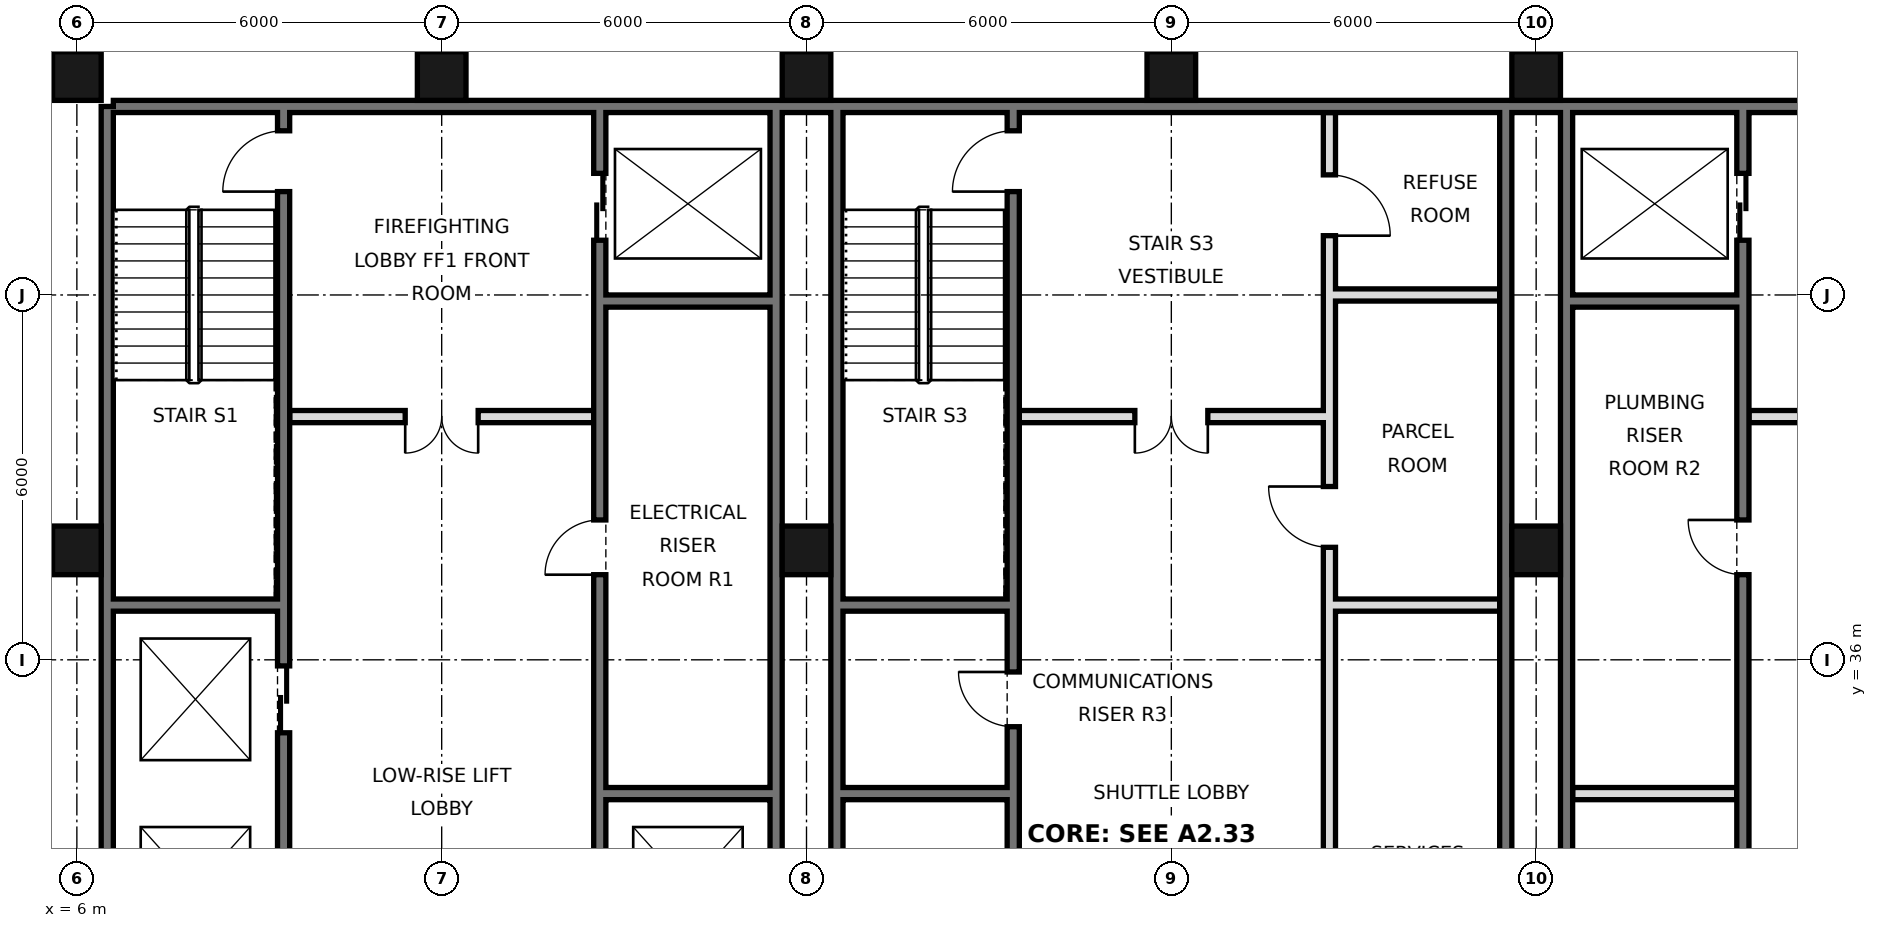
"""IFC4 building model, lengths in metres.
Left out: names, types, materials, properties, quantities, classifications, styles, units other than length and angle.
Written with IfcOpenShell. Run it as: python <this file> out.ifc"""

import sys

from ifc_helpers import new_model, si_unit, direction, frame, frame_2d, origin, origin_2d, place, context, subcontext, project, spatial, rectangle, hollow_rectangle, extrude, element, fill, save


model = new_model("IFC4")
c1 = context("Model", 3, precision=1e-05, world=origin(), true_north=direction((0.0, 1.0)))
c2 = subcontext(c1, "Body", "Model", "MODEL_VIEW")
j1 = project(units=[si_unit("LENGTHUNIT", "METRE"), si_unit("PLANEANGLEUNIT", "RADIAN")], contexts=[c1])
p1 = place(None, origin())
s1 = spatial("IfcSite", under=j1, at=p1, CompositionType="ELEMENT")
p2 = place(p1, origin())
s2 = spatial("IfcBuilding", under=s1, at=p2, CompositionType="ELEMENT")
p3 = place(p2, frame((0.0, 0.0, 130.4)))
s3 = spatial("IfcBuildingStorey", under=s2, at=p3, CompositionType="ELEMENT", Elevation=130.4)
for number, where, z_axis, x_axis in (
    (1, (6.0, 37.8, 0.0), (0.0, 0.0, 1.0), (1.0, 0.0, 0.0)),
    (2, (6.0, 45.6, 0.0), (0.0, 0.0, 1.0), (1.0, 0.0, 0.0)),
    (3, (12.0, 45.6, 0.0), (0.0, 0.0, 1.0), (1.0, 0.0, 0.0)),
    (4, (18.0, 37.8, 0.0), (0.0, 0.0, 1.0), (1.0, 0.0, 0.0)),
    (5, (18.0, 45.6, 0.0), (0.0, 0.0, 1.0), (1.0, 0.0, 0.0)),
    (6, (24.0, 45.6, 0.0), (0.0, 0.0, 1.0), (1.0, 0.0, 0.0)),
    (7, (30.0, 37.8, 0.0), (0.0, 0.0, 1.0), (1.0, 0.0, 0.0)),
    (8, (30.0, 45.6, 0.0), (0.0, 0.0, 1.0), (1.0, 0.0, 0.0)),
):
    element("IfcColumn", number, at=place(p3, frame(where, z_axis=z_axis, x_axis=x_axis)), inside=s3, PredefinedType="COLUMN", context=c2, shape_type="SweptSolid", body=[
        extrude(hollow_rectangle(XDim=0.8, YDim=0.8, WallThickness=0.05, at=origin_2d()), origin(), (0.0, 0.0, 1.0), 3.6),
    ])
p4 = place(p3, frame((6.5, 21.6, 0.0), z_axis=(0.0, 0.0, 1.0), x_axis=(0.0, 1.0, 0.0)))
e9 = element("IfcWall", 9, at=p4, inside=s3, PredefinedType="SOLIDWALL", context=c2, shape_type="SweptSolid", body=[
    extrude(rectangle(XDim=23.5, YDim=0.2, at=frame_2d((11.75, 0.0))), origin(), (0.0, 0.0, 1.0), 3.42),
])
p5 = place(p3, frame((6.6, 45.1, 0.0), z_axis=(0.0, 0.0, 1.0), x_axis=(1.0, 0.0, 0.0)))
e10 = element("IfcWall", 10, at=p5, inside=s3, PredefinedType="SOLIDWALL", context=c2, shape_type="SweptSolid", body=[
    extrude(rectangle(XDim=34.8, YDim=0.2, at=frame_2d((17.4, 0.0))), origin(), (0.0, 0.0, 1.0), 3.42),
])
for number, where, z_axis, x_axis in (
    (11, (17.5, 27.6, 0.0), (0.0, 0.0, 1.0), (0.0, 1.0, 0.0)),
    (12, (18.5, 27.6, 0.0), (0.0, 0.0, 1.0), (0.0, 1.0, 0.0)),
    (13, (29.5, 27.6, 0.0), (0.0, 0.0, 1.0), (0.0, 1.0, 0.0)),
    (14, (30.5, 27.6, 0.0), (0.0, 0.0, 1.0), (0.0, 1.0, 0.0)),
):
    element("IfcWall", number, at=place(p3, frame(where, z_axis=z_axis, x_axis=x_axis)), inside=s3, PredefinedType="SOLIDWALL", context=c2, shape_type="SweptSolid", body=[
        extrude(rectangle(XDim=17.5, YDim=0.2, at=frame_2d((8.75, 0.0))), origin(), (0.0, 0.0, 1.0), 3.42),
    ])
p6 = place(p3, frame((14.6, 27.5, 0.0), z_axis=(0.0, 0.0, 1.0), x_axis=(0.0, 1.0, 0.0)))
e15 = element("IfcWall", 15, at=p6, inside=s3, PredefinedType="SOLIDWALL", context=c2, shape_type="SweptSolid", body=[
    extrude(rectangle(XDim=17.5, YDim=0.2, at=frame_2d((8.75, 0.0))), origin(), (0.0, 0.0, 1.0), 3.42),
])
p7 = place(p6, frame((1.1, 0.0, 0.0)))
e16 = element("IfcOpeningElement", 16, at=p7, cuts=e15, PredefinedType="OPENING", context=c2, shape_type="SweptSolid", body=[
    extrude(rectangle(XDim=1.1, YDim=2.1, at=frame_2d((0.55, 1.05))), frame((0.0, 0.11, 0.0), z_axis=(0.0, -1.0, 0.0), x_axis=(1.0, 0.0, 0.0)), (0.0, 0.0, 1.0), 0.22),
])
p8 = place(p6, frame((4.2, 0.0, 0.0)))
e17 = element("IfcOpeningElement", 17, at=p8, cuts=e15, PredefinedType="OPENING", context=c2, shape_type="SweptSolid", body=[
    extrude(rectangle(XDim=1.1, YDim=2.1, at=frame_2d((0.55, 1.05))), frame((0.0, 0.11, 0.0), z_axis=(0.0, -1.0, 0.0), x_axis=(1.0, 0.0, 0.0)), (0.0, 0.0, 1.0), 0.22),
])
p9 = place(p6, frame((15.4, 0.0, 0.0)))
e18 = element("IfcOpeningElement", 18, at=p9, cuts=e15, PredefinedType="OPENING", context=c2, shape_type="SweptSolid", body=[
    extrude(rectangle(XDim=1.1, YDim=2.1, at=frame_2d((0.55, 1.05))), frame((0.0, 0.11, 0.0), z_axis=(0.0, -1.0, 0.0), x_axis=(1.0, 0.0, 0.0)), (0.0, 0.0, 1.0), 0.22),
])
p10 = place(p6, frame((9.9, 0.0, 0.0)))
e19 = element("IfcOpeningElement", 19, at=p10, cuts=e15, PredefinedType="OPENING", context=c2, shape_type="SweptSolid", body=[
    extrude(rectangle(XDim=0.9, YDim=2.1, at=frame_2d((0.45, 1.05))), frame((0.0, 0.11, 0.0), z_axis=(0.0, -1.0, 0.0), x_axis=(1.0, 0.0, 0.0)), (0.0, 0.0, 1.0), 0.22),
])
p11 = place(p3, frame((21.4, 27.5, 0.0), z_axis=(0.0, 0.0, 1.0), x_axis=(0.0, 1.0, 0.0)))
e20 = element("IfcWall", 20, at=p11, inside=s3, PredefinedType="SOLIDWALL", context=c2, shape_type="SweptSolid", body=[
    extrude(rectangle(XDim=17.5, YDim=0.2, at=frame_2d((8.75, 0.0))), origin(), (0.0, 0.0, 1.0), 3.42),
])
p12 = place(p11, frame((16.2, 0.0, 0.0)))
e21 = element("IfcOpeningElement", 21, at=p12, cuts=e20, PredefinedType="OPENING", context=c2, shape_type="SweptSolid", body=[
    extrude(rectangle(XDim=1.0, YDim=2.1, at=frame_2d((0.5, 1.05))), frame((0.0, 0.11, 0.0), z_axis=(0.0, -1.0, 0.0), x_axis=(1.0, 0.0, 0.0)), (0.0, 0.0, 1.0), 0.22),
])
p13 = place(p11, frame((7.4, 0.0, 0.0)))
e22 = element("IfcOpeningElement", 22, at=p13, cuts=e20, PredefinedType="OPENING", context=c2, shape_type="SweptSolid", body=[
    extrude(rectangle(XDim=0.9, YDim=2.1, at=frame_2d((0.45, 1.05))), frame((0.0, 0.11, 0.0), z_axis=(0.0, -1.0, 0.0), x_axis=(1.0, 0.0, 0.0)), (0.0, 0.0, 1.0), 0.22),
])
p14 = place(p3, frame((26.6, 27.5, 0.0), z_axis=(0.0, 0.0, 1.0), x_axis=(0.0, 1.0, 0.0)))
e23 = element("IfcWall", 23, at=p14, inside=s3, PredefinedType="SOLIDWALL", context=c2, shape_type="SweptSolid", body=[
    extrude(rectangle(XDim=17.5, YDim=0.2, at=frame_2d((8.75, 0.0))), origin(), (0.0, 0.0, 1.0), 3.42),
])
p15 = place(p14, frame((4.3, 0.0, 0.0)))
e24 = element("IfcOpeningElement", 24, at=p15, cuts=e23, PredefinedType="OPENING", context=c2, shape_type="SweptSolid", body=[
    extrude(rectangle(XDim=0.9, YDim=2.1, at=frame_2d((0.45, 1.05))), frame((0.0, 0.11, 0.0), z_axis=(0.0, -1.0, 0.0), x_axis=(1.0, 0.0, 0.0)), (0.0, 0.0, 1.0), 0.22),
])
p16 = place(p14, frame((10.35, 0.0, 0.0)))
e25 = element("IfcOpeningElement", 25, at=p16, cuts=e23, PredefinedType="OPENING", context=c2, shape_type="SweptSolid", body=[
    extrude(rectangle(XDim=1.0, YDim=2.1, at=frame_2d((0.5, 1.05))), frame((0.0, 0.11, 0.0), z_axis=(0.0, -1.0, 0.0), x_axis=(1.0, 0.0, 0.0)), (0.0, 0.0, 1.0), 0.22),
])
p17 = place(p14, frame((15.475, 0.0, 0.0)))
e26 = element("IfcOpeningElement", 26, at=p17, cuts=e23, PredefinedType="OPENING", context=c2, shape_type="SweptSolid", body=[
    extrude(rectangle(XDim=1.0, YDim=2.1, at=frame_2d((0.5, 1.05))), frame((0.0, 0.11, 0.0), z_axis=(0.0, -1.0, 0.0), x_axis=(1.0, 0.0, 0.0)), (0.0, 0.0, 1.0), 0.22),
])
p18 = place(p3, frame((33.4, 27.5, 0.0), z_axis=(0.0, 0.0, 1.0), x_axis=(0.0, 1.0, 0.0)))
e27 = element("IfcWall", 27, at=p18, inside=s3, PredefinedType="SOLIDWALL", context=c2, shape_type="SweptSolid", body=[
    extrude(rectangle(XDim=17.5, YDim=0.2, at=frame_2d((8.75, 0.0))), origin(), (0.0, 0.0, 1.0), 3.42),
])
p19 = place(p18, frame((15.4, 0.0, 0.0)))
e28 = element("IfcOpeningElement", 28, at=p19, cuts=e27, PredefinedType="OPENING", context=c2, shape_type="SweptSolid", body=[
    extrude(rectangle(XDim=1.1, YDim=2.1, at=frame_2d((0.55, 1.05))), frame((0.0, 0.11, 0.0), z_axis=(0.0, -1.0, 0.0), x_axis=(1.0, 0.0, 0.0)), (0.0, 0.0, 1.0), 0.22),
])
p20 = place(p18, frame((2.7, 0.0, 0.0)))
e29 = element("IfcOpeningElement", 29, at=p20, cuts=e27, PredefinedType="OPENING", context=c2, shape_type="SweptSolid", body=[
    extrude(rectangle(XDim=1.0, YDim=2.1, at=frame_2d((0.5, 1.05))), frame((0.0, 0.11, 0.0), z_axis=(0.0, -1.0, 0.0), x_axis=(1.0, 0.0, 0.0)), (0.0, 0.0, 1.0), 0.22),
])
p21 = place(p18, frame((9.9, 0.0, 0.0)))
e30 = element("IfcOpeningElement", 30, at=p21, cuts=e27, PredefinedType="OPENING", context=c2, shape_type="SweptSolid", body=[
    extrude(rectangle(XDim=0.9, YDim=2.1, at=frame_2d((0.45, 1.05))), frame((0.0, 0.11, 0.0), z_axis=(0.0, -1.0, 0.0), x_axis=(1.0, 0.0, 0.0)), (0.0, 0.0, 1.0), 0.22),
])
p22 = place(p3, frame((9.4, 21.6, 0.0), z_axis=(0.0, 0.0, 1.0), x_axis=(0.0, 1.0, 0.0)))
e31 = element("IfcWall", 31, at=p22, inside=s3, PredefinedType="SOLIDWALL", context=c2, shape_type="SweptSolid", body=[
    extrude(rectangle(XDim=23.4, YDim=0.2, at=frame_2d((11.7, 0.0))), origin(), (0.0, 0.0, 1.0), 3.42),
])
p23 = place(p22, frame((7.0, 0.0, 0.0)))
e32 = element("IfcOpeningElement", 32, at=p23, cuts=e31, PredefinedType="OPENING", context=c2, shape_type="SweptSolid", body=[
    extrude(rectangle(XDim=1.1, YDim=2.1, at=frame_2d((0.55, 1.05))), frame((0.0, 0.11, 0.0), z_axis=(0.0, -1.0, 0.0), x_axis=(1.0, 0.0, 0.0)), (0.0, 0.0, 1.0), 0.22),
])
p24 = place(p22, frame((10.1, 0.0, 0.0)))
e33 = element("IfcOpeningElement", 33, at=p24, cuts=e31, PredefinedType="OPENING", context=c2, shape_type="SweptSolid", body=[
    extrude(rectangle(XDim=1.1, YDim=2.1, at=frame_2d((0.55, 1.05))), frame((0.0, 0.11, 0.0), z_axis=(0.0, -1.0, 0.0), x_axis=(1.0, 0.0, 0.0)), (0.0, 0.0, 1.0), 0.22),
])
p25 = place(p22, frame((13.2, 0.0, 0.0)))
e34 = element("IfcOpeningElement", 34, at=p25, cuts=e31, PredefinedType="OPENING", context=c2, shape_type="SweptSolid", body=[
    extrude(rectangle(XDim=1.1, YDim=2.1, at=frame_2d((0.55, 1.05))), frame((0.0, 0.11, 0.0), z_axis=(0.0, -1.0, 0.0), x_axis=(1.0, 0.0, 0.0)), (0.0, 0.0, 1.0), 0.22),
])
p26 = place(p22, frame((22.1, 0.0, 0.0)))
e35 = element("IfcOpeningElement", 35, at=p26, cuts=e31, PredefinedType="OPENING", context=c2, shape_type="SweptSolid", body=[
    extrude(rectangle(XDim=1.0, YDim=2.1, at=frame_2d((0.5, 1.05))), frame((0.0, 0.11, 0.0), z_axis=(0.0, -1.0, 0.0), x_axis=(1.0, 0.0, 0.0)), (0.0, 0.0, 1.0), 0.22),
])
p27 = place(p22, frame((0.175, 0.0, 0.0)))
e36 = element("IfcOpeningElement", 36, at=p27, cuts=e31, PredefinedType="OPENING", context=c2, shape_type="SweptSolid", body=[
    extrude(rectangle(XDim=0.9, YDim=2.1, at=frame_2d((0.45, 1.05))), frame((0.0, 0.11, 0.0), z_axis=(0.0, -1.0, 0.0), x_axis=(1.0, 0.0, 0.0)), (0.0, 0.0, 1.0), 0.22),
])
for number, where, z_axis, x_axis in (
    (37, (14.7, 33.8, 0.0), (0.0, 0.0, 1.0), (1.0, 0.0, 0.0)),
    (38, (18.6, 33.8, 0.0), (0.0, 0.0, 1.0), (1.0, 0.0, 0.0)),
    (39, (30.6, 33.8, 0.0), (0.0, 0.0, 1.0), (1.0, 0.0, 0.0)),
    (40, (18.6, 36.9, 0.0), (0.0, 0.0, 1.0), (1.0, 0.0, 0.0)),
    (41, (26.7, 36.9, 0.0), (0.0, 0.0, 1.0), (1.0, 0.0, 0.0)),
    (42, (6.6, 36.9, 0.0), (0.0, 0.0, 1.0), (1.0, 0.0, 0.0)),
):
    element("IfcWall", number, at=place(p3, frame(where, z_axis=z_axis, x_axis=x_axis)), inside=s3, PredefinedType="SOLIDWALL", context=c2, shape_type="SweptSolid", body=[
        extrude(rectangle(XDim=2.7, YDim=0.2, at=frame_2d((1.35, 0.0))), origin(), (0.0, 0.0, 1.0), 3.42),
    ])
p28 = place(p3, frame((21.5, 40.0, 0.0), z_axis=(0.0, 0.0, 1.0), x_axis=(1.0, 0.0, 0.0)))
e43 = element("IfcWall", 43, at=p28, inside=s3, PredefinedType="PARTITIONING", context=c2, shape_type="SweptSolid", body=[
    extrude(rectangle(XDim=5.0, YDim=0.2, at=frame_2d((2.5, 0.0))), origin(), (0.0, 0.0, 1.0), 3.42),
])
p29 = place(p28, frame((1.9, 0.0, 0.0)))
e44 = element("IfcOpeningElement", 44, at=p29, cuts=e43, PredefinedType="OPENING", context=c2, shape_type="SweptSolid", body=[
    extrude(rectangle(XDim=1.2, YDim=2.1, at=frame_2d((0.6, 1.05))), frame((0.0, 0.11, 0.0), z_axis=(0.0, -1.0, 0.0), x_axis=(1.0, 0.0, 0.0)), (0.0, 0.0, 1.0), 0.22),
])
p30 = place(p3, frame((33.5, 40.0, 0.0), z_axis=(0.0, 0.0, 1.0), x_axis=(1.0, 0.0, 0.0)))
e45 = element("IfcWall", 45, at=p30, inside=s3, PredefinedType="PARTITIONING", context=c2, shape_type="SweptSolid", body=[
    extrude(rectangle(XDim=5.0, YDim=0.2, at=frame_2d((2.5, 0.0))), origin(), (0.0, 0.0, 1.0), 3.42),
])
p31 = place(p30, frame((1.9, 0.0, 0.0)))
e46 = element("IfcOpeningElement", 46, at=p31, cuts=e45, PredefinedType="OPENING", context=c2, shape_type="SweptSolid", body=[
    extrude(rectangle(XDim=1.2, YDim=2.1, at=frame_2d((0.6, 1.05))), frame((0.0, 0.11, 0.0), z_axis=(0.0, -1.0, 0.0), x_axis=(1.0, 0.0, 0.0)), (0.0, 0.0, 1.0), 0.22),
])
p32 = place(p3, frame((9.5, 40.0, 0.0), z_axis=(0.0, 0.0, 1.0), x_axis=(1.0, 0.0, 0.0)))
e47 = element("IfcWall", 47, at=p32, inside=s3, PredefinedType="PARTITIONING", context=c2, shape_type="SweptSolid", body=[
    extrude(rectangle(XDim=5.0, YDim=0.2, at=frame_2d((2.5, 0.0))), origin(), (0.0, 0.0, 1.0), 3.42),
])
p33 = place(p32, frame((1.9, 0.0, 0.0)))
e48 = element("IfcOpeningElement", 48, at=p33, cuts=e47, PredefinedType="OPENING", context=c2, shape_type="SweptSolid", body=[
    extrude(rectangle(XDim=1.2, YDim=2.1, at=frame_2d((0.6, 1.05))), frame((0.0, 0.11, 0.0), z_axis=(0.0, -1.0, 0.0), x_axis=(1.0, 0.0, 0.0)), (0.0, 0.0, 1.0), 0.22),
])
for number, where, z_axis, x_axis in (
    (49, (14.7, 41.9, 0.0), (0.0, 0.0, 1.0), (1.0, 0.0, 0.0)),
    (50, (30.6, 41.9, 0.0), (0.0, 0.0, 1.0), (1.0, 0.0, 0.0)),
):
    element("IfcWall", number, at=place(p3, frame(where, z_axis=z_axis, x_axis=x_axis)), inside=s3, PredefinedType="SOLIDWALL", context=c2, shape_type="SweptSolid", body=[
        extrude(rectangle(XDim=2.7, YDim=0.2, at=frame_2d((1.35, 0.0))), origin(), (0.0, 0.0, 1.0), 3.42),
    ])
p34 = place(p3, frame((26.7, 42.0, 0.0), z_axis=(0.0, 0.0, 1.0), x_axis=(1.0, 0.0, 0.0)))
e51 = element("IfcWall", 51, at=p34, inside=s3, PredefinedType="PARTITIONING", context=c2, shape_type="SweptSolid", body=[
    extrude(rectangle(XDim=2.7, YDim=0.2, at=frame_2d((1.35, 0.0))), origin(), (0.0, 0.0, 1.0), 3.42),
])
p35 = place(p33, frame((1.2, 0.0, 0.0), z_axis=(0.0, 0.0, 1.0), x_axis=(-1.0, 0.0, 0.0)))
e52 = element("IfcDoor", 52, at=p35, inside=s3, OperationType="DOUBLE_DOOR_SINGLE_SWING", PredefinedType="DOOR", context=c2, shape_type="SweptSolid", body=[
    extrude(rectangle(XDim=1.2, YDim=2.1, at=frame_2d((0.6, 1.05))), frame((0.0, 0.025, 0.0), z_axis=(0.0, -1.0, 0.0), x_axis=(1.0, 0.0, 0.0)), (0.0, 0.0, 1.0), 0.05),
])
fill(e48, e52)
p36 = place(p29, frame((1.2, 0.0, 0.0), z_axis=(0.0, 0.0, 1.0), x_axis=(-1.0, 0.0, 0.0)))
e53 = element("IfcDoor", 53, at=p36, inside=s3, OperationType="DOUBLE_DOOR_SINGLE_SWING", PredefinedType="DOOR", context=c2, shape_type="SweptSolid", body=[
    extrude(rectangle(XDim=1.2, YDim=2.1, at=frame_2d((0.6, 1.05))), frame((0.0, 0.025, 0.0), z_axis=(0.0, -1.0, 0.0), x_axis=(1.0, 0.0, 0.0)), (0.0, 0.0, 1.0), 0.05),
])
fill(e44, e53)
p37 = place(p19, origin())
e54 = element("IfcDoor", 54, at=p37, inside=s3, OperationType="DOUBLE_DOOR_SLIDING", PredefinedType="DOOR", context=c2, shape_type="SweptSolid", body=[
    extrude(rectangle(XDim=1.1, YDim=2.1, at=frame_2d((0.55, 1.05))), frame((0.0, 0.025, 0.0), z_axis=(0.0, -1.0, 0.0), x_axis=(1.0, 0.0, 0.0)), (0.0, 0.0, 1.0), 0.05),
])
fill(e28, e54)
p38 = place(p9, origin())
e55 = element("IfcDoor", 55, at=p38, inside=s3, OperationType="DOUBLE_DOOR_SLIDING", PredefinedType="DOOR", context=c2, shape_type="SweptSolid", body=[
    extrude(rectangle(XDim=1.1, YDim=2.1, at=frame_2d((0.55, 1.05))), frame((0.0, 0.025, 0.0), z_axis=(0.0, -1.0, 0.0), x_axis=(1.0, 0.0, 0.0)), (0.0, 0.0, 1.0), 0.05),
])
fill(e18, e55)
p39 = place(p25, origin())
e56 = element("IfcDoor", 56, at=p39, inside=s3, OperationType="DOUBLE_DOOR_SLIDING", PredefinedType="DOOR", context=c2, shape_type="SweptSolid", body=[
    extrude(rectangle(XDim=1.1, YDim=2.1, at=frame_2d((0.55, 1.05))), frame((0.0, 0.025, 0.0), z_axis=(0.0, -1.0, 0.0), x_axis=(1.0, 0.0, 0.0)), (0.0, 0.0, 1.0), 0.05),
])
fill(e34, e56)
p40 = place(p26, origin())
e57 = element("IfcDoor", 57, at=p40, inside=s3, OperationType="SINGLE_SWING_LEFT", PredefinedType="DOOR", context=c2, shape_type="SweptSolid", body=[
    extrude(rectangle(XDim=1.0, YDim=2.1, at=frame_2d((0.5, 1.05))), frame((0.0, 0.025, 0.0), z_axis=(0.0, -1.0, 0.0), x_axis=(1.0, 0.0, 0.0)), (0.0, 0.0, 1.0), 0.05),
])
fill(e35, e57)
p41 = place(p12, origin())
e58 = element("IfcDoor", 58, at=p41, inside=s3, OperationType="SINGLE_SWING_LEFT", PredefinedType="DOOR", context=c2, shape_type="SweptSolid", body=[
    extrude(rectangle(XDim=1.0, YDim=2.1, at=frame_2d((0.5, 1.05))), frame((0.0, 0.025, 0.0), z_axis=(0.0, -1.0, 0.0), x_axis=(1.0, 0.0, 0.0)), (0.0, 0.0, 1.0), 0.05),
])
fill(e21, e58)
p42 = place(p10, origin())
e59 = element("IfcDoor", 59, at=p42, inside=s3, OperationType="SINGLE_SWING_LEFT", PredefinedType="DOOR", context=c2, shape_type="SweptSolid", body=[
    extrude(rectangle(XDim=0.9, YDim=2.1, at=frame_2d((0.45, 1.05))), frame((0.0, 0.025, 0.0), z_axis=(0.0, -1.0, 0.0), x_axis=(1.0, 0.0, 0.0)), (0.0, 0.0, 1.0), 0.05),
])
fill(e19, e59)
p43 = place(p21, frame((0.9, 0.0, 0.0), z_axis=(0.0, 0.0, 1.0), x_axis=(-1.0, 0.0, 0.0)))
e60 = element("IfcDoor", 60, at=p43, inside=s3, OperationType="SINGLE_SWING_LEFT", PredefinedType="DOOR", context=c2, shape_type="SweptSolid", body=[
    extrude(rectangle(XDim=0.9, YDim=2.1, at=frame_2d((0.45, 1.05))), frame((0.0, 0.025, 0.0), z_axis=(0.0, -1.0, 0.0), x_axis=(1.0, 0.0, 0.0)), (0.0, 0.0, 1.0), 0.05),
])
fill(e30, e60)
p44 = place(p13, frame((0.9, 0.0, 0.0), z_axis=(0.0, 0.0, 1.0), x_axis=(-1.0, 0.0, 0.0)))
e61 = element("IfcDoor", 61, at=p44, inside=s3, OperationType="SINGLE_SWING_LEFT", PredefinedType="DOOR", context=c2, shape_type="SweptSolid", body=[
    extrude(rectangle(XDim=0.9, YDim=2.1, at=frame_2d((0.45, 1.05))), frame((0.0, 0.025, 0.0), z_axis=(0.0, -1.0, 0.0), x_axis=(1.0, 0.0, 0.0)), (0.0, 0.0, 1.0), 0.05),
])
fill(e22, e61)
p45 = place(p16, frame((1.0, 0.0, 0.0), z_axis=(0.0, 0.0, 1.0), x_axis=(-1.0, 0.0, 0.0)))
e62 = element("IfcDoor", 62, at=p45, inside=s3, OperationType="SINGLE_SWING_LEFT", PredefinedType="DOOR", context=c2, shape_type="SweptSolid", body=[
    extrude(rectangle(XDim=1.0, YDim=2.1, at=frame_2d((0.5, 1.05))), frame((0.0, 0.025, 0.0), z_axis=(0.0, -1.0, 0.0), x_axis=(1.0, 0.0, 0.0)), (0.0, 0.0, 1.0), 0.05),
])
fill(e25, e62)
p46 = place(p17, frame((1.0, 0.0, 0.0), z_axis=(0.0, 0.0, 1.0), x_axis=(-1.0, 0.0, 0.0)))
e63 = element("IfcDoor", 63, at=p46, inside=s3, OperationType="SINGLE_SWING_RIGHT", PredefinedType="DOOR", context=c2, shape_type="SweptSolid", body=[
    extrude(rectangle(XDim=1.0, YDim=2.1, at=frame_2d((0.5, 1.05))), frame((0.0, 0.025, 0.0), z_axis=(0.0, -1.0, 0.0), x_axis=(1.0, 0.0, 0.0)), (0.0, 0.0, 1.0), 0.05),
])
fill(e26, e63)
save(model, sys.argv[1])
